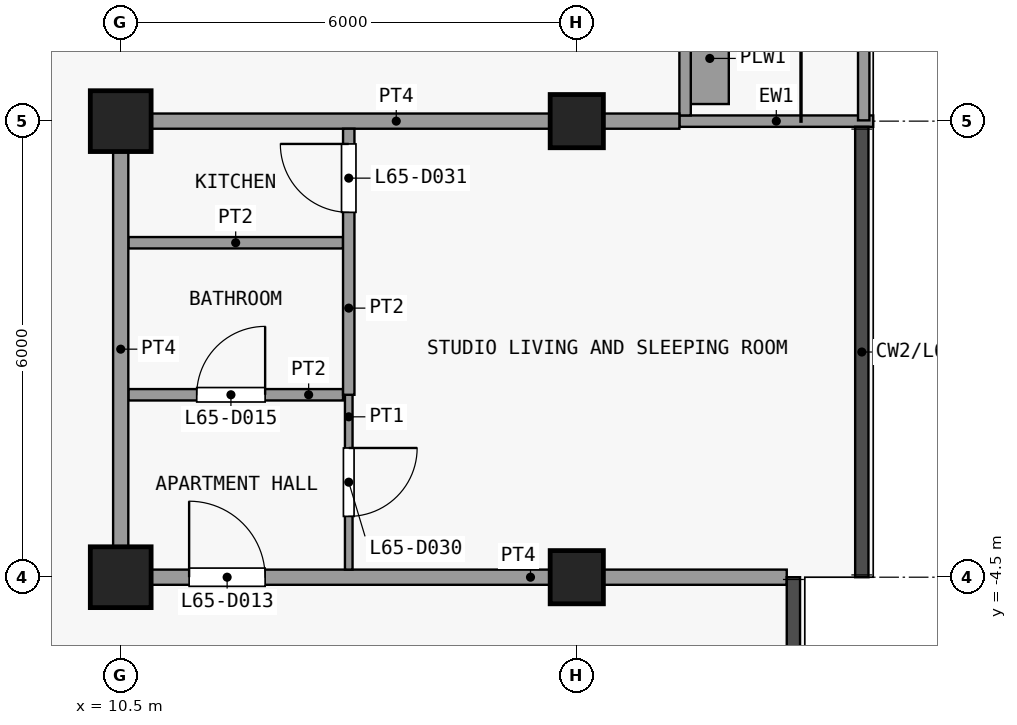
"""IFC4 building model, lengths in metres.
Left out: names, types, materials, properties, quantities, classifications, styles, units other than length and angle.
Written with IfcOpenShell. Run it as: python <this file> out.ifc"""

import sys

from ifc_helpers import new_model, si_unit, direction, frame, frame_2d, origin, origin_2d, place, context, subcontext, project, spatial, rectangle, extrude, element, fill, save


model = new_model("IFC4")
c1 = context("Model", 3, precision=1e-05, world=origin(), true_north=direction((0.0, 1.0)))
c2 = subcontext(c1, "Body", "Model", "MODEL_VIEW")
j1 = project(units=[si_unit("LENGTHUNIT", "METRE"), si_unit("PLANEANGLEUNIT", "RADIAN")], contexts=[c1])
p1 = place(None, origin())
s1 = spatial("IfcSite", under=j1, at=p1, CompositionType="ELEMENT")
p2 = place(p1, origin())
s2 = spatial("IfcBuilding", under=s1, at=p2, CompositionType="ELEMENT")
p3 = place(p2, frame((0.0, 0.0, 259.1)))
s3 = spatial("IfcBuildingStorey", under=s2, at=p3, CompositionType="ELEMENT", Elevation=259.1)
for number, where, z_axis, x_axis in (
    (1, (10.5, -4.5, 0.0), (0.0, 0.0, 1.0), (1.0, 0.0, 0.0)),
    (2, (10.5, 1.5, 0.0), (0.0, 0.0, 1.0), (1.0, 0.0, 0.0)),
):
    element("IfcColumn", number, at=place(p3, frame(where, z_axis=z_axis, x_axis=x_axis)), inside=s3, PredefinedType="COLUMN", context=c2, shape_type="SweptSolid", body=[
        extrude(rectangle(XDim=0.8, YDim=0.8, at=origin_2d()), origin(), (0.0, 0.0, 1.0), 3.6),
    ])
for number, where, z_axis, x_axis in (
    (3, (16.5, -4.5, 0.0), (0.0, 0.0, 1.0), (1.0, 0.0, 0.0)),
    (4, (16.5, 1.5, 0.0), (0.0, 0.0, 1.0), (1.0, 0.0, 0.0)),
):
    element("IfcColumn", number, at=place(p3, frame(where, z_axis=z_axis, x_axis=x_axis)), inside=s3, PredefinedType="COLUMN", context=c2, shape_type="SweptSolid", body=[
        extrude(rectangle(XDim=0.7, YDim=0.7, at=origin_2d()), origin(), (0.0, 0.0, 1.0), 3.6),
    ])
p4 = place(p3, frame((17.85, 1.5, 0.0), z_axis=(0.0, 0.0, 1.0), x_axis=(1.0, 0.0, 0.0)))
e5 = element("IfcWall", 5, at=p4, inside=s3, PredefinedType="SOLIDWALL", context=c2, shape_type="SweptSolid", body=[
    extrude(rectangle(XDim=2.55, YDim=0.15, at=frame_2d((1.275, 0.0))), origin(), (0.0, 0.0, 1.0), 3.3),
])
p5 = place(p3, frame((17.925, 7.425, 0.0), z_axis=(0.0, 0.0, 1.0), x_axis=(0.0, -1.0, 0.0)))
e6 = element("IfcWall", 6, at=p5, inside=s3, PredefinedType="SOLIDWALL", context=c2, shape_type="SweptSolid", body=[
    extrude(rectangle(XDim=5.85, YDim=0.15, at=frame_2d((2.925, 0.0))), origin(), (0.0, 0.0, 1.0), 3.3),
])
p6 = place(p5, frame((1.15, 0.0, 0.0)))
e7 = element("IfcOpeningElement", 7, at=p6, cuts=e6, PredefinedType="OPENING", context=c2, shape_type="SweptSolid", body=[
    extrude(rectangle(XDim=1.2, YDim=2.4, at=frame_2d((0.6, 1.2))), frame((0.0, 0.085, 0.0), z_axis=(0.0, -1.0, 0.0), x_axis=(1.0, 0.0, 0.0)), (0.0, 0.0, 1.0), 0.17),
])
p7 = place(p5, frame((3.2, 0.0, 0.9)))
e8 = element("IfcOpeningElement", 8, at=p7, cuts=e6, PredefinedType="OPENING", context=c2, shape_type="SweptSolid", body=[
    extrude(rectangle(XDim=1.8, YDim=2.1, at=frame_2d((0.9, 1.05))), frame((0.0, 0.085, 0.0), z_axis=(0.0, -1.0, 0.0), x_axis=(1.0, 0.0, 0.0)), (0.0, 0.0, 1.0), 0.17),
])
p8 = place(p3, frame((18.25, 1.725, 0.0), z_axis=(0.0, 0.0, 1.0), x_axis=(0.0, 1.0, 0.0)))
e9 = element("IfcWall", 9, at=p8, inside=s3, PredefinedType="USERDEFINED", context=c2, shape_type="SweptSolid", body=[
    extrude(rectangle(XDim=1.2, YDim=0.5, at=frame_2d((0.6, 0.0))), origin(), (0.0, 0.0, 1.0), 0.9),
])
p9 = place(p3, frame((20.275, 7.3, 0.0), z_axis=(0.0, 0.0, 1.0), x_axis=(0.0, -1.0, 0.0)))
e10 = element("IfcWall", 10, at=p9, inside=s3, PredefinedType="PARAPET", context=c2, shape_type="SweptSolid", body=[
    extrude(rectangle(XDim=5.79, YDim=0.15, at=frame_2d((2.895, 0.0))), origin(), (0.0, 0.0, 1.0), 1.15),
])
p10 = place(p3, frame((10.4, -4.5, 0.0), z_axis=(0.0, 0.0, 1.0), x_axis=(1.0, 0.0, 0.0)))
e11 = element("IfcWall", 11, at=p10, inside=s3, PredefinedType="PARTITIONING", context=c2, shape_type="SweptSolid", body=[
    extrude(rectangle(XDim=8.863, YDim=0.2, at=frame_2d((4.431, 0.0))), origin(), (0.0, 0.0, 1.0), 3.3),
])
p11 = place(p10, frame((1.0, 0.0, 0.0)))
e12 = element("IfcOpeningElement", 12, at=p11, cuts=e11, PredefinedType="OPENING", context=c2, shape_type="SweptSolid", body=[
    extrude(rectangle(XDim=1.0, YDim=2.1, at=frame_2d((0.5, 1.05))), frame((0.0, 0.11, 0.0), z_axis=(0.0, -1.0, 0.0), x_axis=(1.0, 0.0, 0.0)), (0.0, 0.0, 1.0), 0.22),
])
p12 = place(p3, frame((10.6, -2.1, 0.0), z_axis=(0.0, 0.0, 1.0), x_axis=(1.0, 0.0, 0.0)))
e13 = element("IfcWall", 13, at=p12, inside=s3, PredefinedType="PARTITIONING", context=c2, shape_type="SweptSolid", body=[
    extrude(rectangle(XDim=2.825, YDim=0.15, at=frame_2d((1.413, 0.0))), origin(), (0.0, 0.0, 1.0), 3.3),
])
p13 = place(p12, frame((0.9, 0.0, 0.0)))
e14 = element("IfcOpeningElement", 14, at=p13, cuts=e13, PredefinedType="OPENING", context=c2, shape_type="SweptSolid", body=[
    extrude(rectangle(XDim=0.9, YDim=2.1, at=frame_2d((0.45, 1.05))), frame((0.0, 0.085, 0.0), z_axis=(0.0, -1.0, 0.0), x_axis=(1.0, 0.0, 0.0)), (0.0, 0.0, 1.0), 0.17),
])
p14 = place(p3, frame((10.6, -0.1, 0.0), z_axis=(0.0, 0.0, 1.0), x_axis=(1.0, 0.0, 0.0)))
e15 = element("IfcWall", 15, at=p14, inside=s3, PredefinedType="PARTITIONING", context=c2, shape_type="SweptSolid", body=[
    extrude(rectangle(XDim=2.825, YDim=0.15, at=frame_2d((1.413, 0.0))), origin(), (0.0, 0.0, 1.0), 3.3),
])
p15 = place(p3, frame((10.4, 1.5, 0.0), z_axis=(0.0, 0.0, 1.0), x_axis=(1.0, 0.0, 0.0)))
e16 = element("IfcWall", 16, at=p15, inside=s3, PredefinedType="PARTITIONING", context=c2, shape_type="SweptSolid", body=[
    extrude(rectangle(XDim=7.45, YDim=0.2, at=frame_2d((3.725, 0.0))), origin(), (0.0, 0.0, 1.0), 3.3),
])
p16 = place(p3, frame((10.5, -4.4, 0.0), z_axis=(0.0, 0.0, 1.0), x_axis=(0.0, 1.0, 0.0)))
e17 = element("IfcWall", 17, at=p16, inside=s3, PredefinedType="PARTITIONING", context=c2, shape_type="SweptSolid", body=[
    extrude(rectangle(XDim=5.8, YDim=0.2, at=frame_2d((2.9, 0.0))), origin(), (0.0, 0.0, 1.0), 3.3),
])
p17 = place(p3, frame((13.5, -4.4, 0.0), z_axis=(0.0, 0.0, 1.0), x_axis=(0.0, 1.0, 0.0)))
e18 = element("IfcWall", 18, at=p17, inside=s3, PredefinedType="PARTITIONING", context=c2, shape_type="SweptSolid", body=[
    extrude(rectangle(XDim=2.3, YDim=0.1, at=frame_2d((1.15, 0.0))), origin(), (0.0, 0.0, 1.0), 3.3),
])
p18 = place(p17, frame((0.7, 0.0, 0.0)))
e19 = element("IfcOpeningElement", 19, at=p18, cuts=e18, PredefinedType="OPENING", context=c2, shape_type="SweptSolid", body=[
    extrude(rectangle(XDim=0.9, YDim=2.1, at=frame_2d((0.45, 1.05))), frame((0.0, 0.06, 0.0), z_axis=(0.0, -1.0, 0.0), x_axis=(1.0, 0.0, 0.0)), (0.0, 0.0, 1.0), 0.12),
])
p19 = place(p3, frame((13.5, -2.1, 0.0), z_axis=(0.0, 0.0, 1.0), x_axis=(0.0, 1.0, 0.0)))
e20 = element("IfcWall", 20, at=p19, inside=s3, PredefinedType="PARTITIONING", context=c2, shape_type="SweptSolid", body=[
    extrude(rectangle(XDim=3.5, YDim=0.15, at=frame_2d((1.75, 0.0))), origin(), (0.0, 0.0, 1.0), 3.3),
])
p20 = place(p19, frame((2.4, 0.0, 0.0)))
e21 = element("IfcOpeningElement", 21, at=p20, cuts=e20, PredefinedType="OPENING", context=c2, shape_type="SweptSolid", body=[
    extrude(rectangle(XDim=0.9, YDim=2.1, at=frame_2d((0.45, 1.05))), frame((0.0, 0.085, 0.0), z_axis=(0.0, -1.0, 0.0), x_axis=(1.0, 0.0, 0.0)), (0.0, 0.0, 1.0), 0.17),
])
p21 = place(p11, origin())
e22 = element("IfcDoor", 22, at=p21, inside=s3, OperationType="SINGLE_SWING_RIGHT", PredefinedType="DOOR", context=c2, shape_type="SweptSolid", body=[
    extrude(rectangle(XDim=1.0, YDim=2.1, at=frame_2d((0.5, 1.05))), frame((0.0, 0.025, 0.0), z_axis=(0.0, -1.0, 0.0), x_axis=(1.0, 0.0, 0.0)), (0.0, 0.0, 1.0), 0.05),
])
fill(e12, e22)
p22 = place(p13, origin())
e23 = element("IfcDoor", 23, at=p22, inside=s3, OperationType="SINGLE_SWING_LEFT", PredefinedType="DOOR", context=c2, shape_type="SweptSolid", body=[
    extrude(rectangle(XDim=0.9, YDim=2.1, at=frame_2d((0.45, 1.05))), frame((0.0, 0.025, 0.0), z_axis=(0.0, -1.0, 0.0), x_axis=(1.0, 0.0, 0.0)), (0.0, 0.0, 1.0), 0.05),
])
fill(e14, e23)
p23 = place(p18, origin())
e24 = element("IfcDoor", 24, at=p23, inside=s3, OperationType="SINGLE_SWING_RIGHT", PredefinedType="DOOR", context=c2, shape_type="SweptSolid", body=[
    extrude(rectangle(XDim=0.9, YDim=2.1, at=frame_2d((0.45, 1.05))), frame((0.0, 0.025, 0.0), z_axis=(0.0, -1.0, 0.0), x_axis=(1.0, 0.0, 0.0)), (0.0, 0.0, 1.0), 0.05),
])
fill(e19, e24)
p24 = place(p20, origin())
e25 = element("IfcDoor", 25, at=p24, inside=s3, OperationType="SINGLE_SWING_LEFT", PredefinedType="DOOR", context=c2, shape_type="SweptSolid", body=[
    extrude(rectangle(XDim=0.9, YDim=2.1, at=frame_2d((0.45, 1.05))), frame((0.0, 0.025, 0.0), z_axis=(0.0, -1.0, 0.0), x_axis=(1.0, 0.0, 0.0)), (0.0, 0.0, 1.0), 0.05),
])
fill(e21, e25)
save(model, sys.argv[1])
